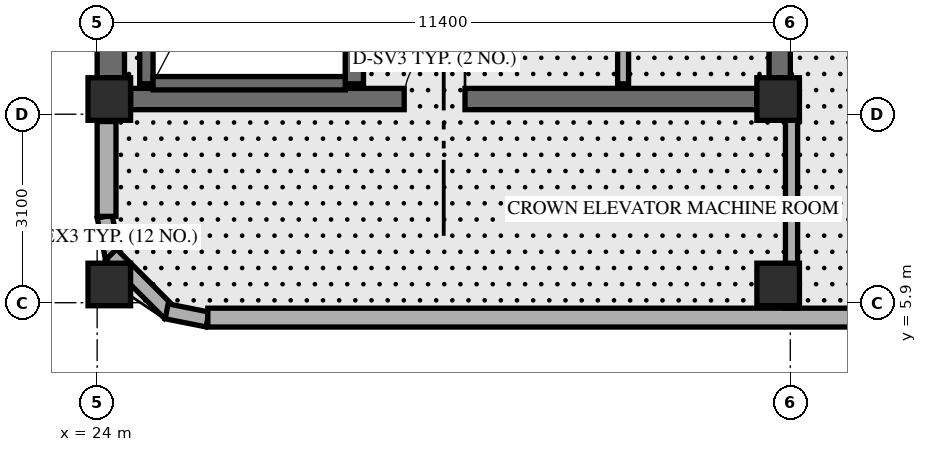
"""IFC4 building model, lengths in metres.
Left out: names, types, materials, properties, quantities, classifications, styles, units other than length and angle.
Written with IfcOpenShell. Run it as: python <this file> out.ifc"""

import sys

from ifc_helpers import new_model, si_unit, direction, frame, frame_2d, origin, origin_2d, place, context, subcontext, project, spatial, rectangle, extrude, element, fill, save


model = new_model("IFC4")
c1 = context("Model", 3, precision=1e-05, world=origin(), true_north=direction((0.0, 1.0)))
c2 = subcontext(c1, "Body", "Model", "MODEL_VIEW")
j1 = project(units=[si_unit("LENGTHUNIT", "METRE"), si_unit("PLANEANGLEUNIT", "RADIAN")], contexts=[c1])
p1 = place(None, origin())
s1 = spatial("IfcSite", under=j1, at=p1, CompositionType="ELEMENT")
p2 = place(p1, origin())
s2 = spatial("IfcBuilding", under=s1, at=p2, CompositionType="ELEMENT")
p3 = place(p2, frame((0.0, 0.0, 287.0)))
s3 = spatial("IfcBuildingStorey", under=s2, at=p3, CompositionType="ELEMENT", Elevation=287.0)
p4 = place(p3, frame((24.225, 9.6, 0.0), z_axis=(0.0, 0.0, 1.0), x_axis=(0.0, 1.0, 0.0)))
e1 = element("IfcWall", 1, at=p4, inside=s3, PredefinedType="SHEAR", context=c2, shape_type="SweptSolid", body=[
    extrude(rectangle(XDim=7.6, YDim=0.45, at=frame_2d((3.8, 0.0))), origin(), (0.0, 0.0, 1.0), 5.161),
])
p5 = place(p3, frame((35.225, 9.6, 0.0), z_axis=(0.0, 0.0, 1.0), x_axis=(0.0, 1.0, 0.0)))
e2 = element("IfcWall", 2, at=p5, inside=s3, PredefinedType="SHEAR", context=c2, shape_type="SweptSolid", body=[
    extrude(rectangle(XDim=5.95, YDim=0.35, at=frame_2d((2.975, 0.0))), origin(), (0.0, 0.0, 1.0), 5.161),
])
p6 = place(p3, frame((24.55, 9.25, 0.0), z_axis=(0.0, 0.0, 1.0), x_axis=(1.0, 0.0, 0.0)))
e3 = element("IfcWall", 3, at=p6, inside=s3, PredefinedType="SHEAR", context=c2, shape_type="SweptSolid", body=[
    extrude(rectangle(XDim=10.3, YDim=0.35, at=frame_2d((5.15, 0.0))), origin(), (0.0, 0.0, 1.0), 5.7),
])
p7 = place(p6, frame((4.5, 0.0, 0.0)))
e4 = element("IfcOpeningElement", 4, at=p7, cuts=e3, PredefinedType="OPENING", context=c2, shape_type="SweptSolid", body=[
    extrude(rectangle(XDim=1.0, YDim=2.15, at=frame_2d((0.5, 1.075))), frame((0.0, 0.185, 0.0), z_axis=(0.0, -1.0, 0.0), x_axis=(1.0, 0.0, 0.0)), (0.0, 0.0, 1.0), 0.37),
])
p8 = place(p3, frame((24.81, 9.5, 0.0), z_axis=(0.0, 0.0, 1.0), x_axis=(0.0, 1.0, 0.0)))
e5 = element("IfcWall", 5, at=p8, inside=s3, PredefinedType="SHEAR", context=c2, shape_type="SweptSolid", body=[
    extrude(rectangle(XDim=7.76, YDim=0.22, at=frame_2d((3.88, 0.0))), origin(), (0.0, 0.0, 1.0), 5.7),
])
p9 = place(p3, frame((28.23, 9.5, 0.0), z_axis=(0.0, 0.0, 1.0), x_axis=(0.0, 1.0, 0.0)))
e6 = element("IfcWall", 6, at=p9, inside=s3, PredefinedType="SHEAR", context=c2, shape_type="SweptSolid", body=[
    extrude(rectangle(XDim=7.76, YDim=0.3, at=frame_2d((3.88, 0.0))), origin(), (0.0, 0.0, 1.0), 5.7),
])
p10 = place(p3, frame((24.92, 9.51, 0.0), z_axis=(0.0, 0.0, 1.0), x_axis=(1.0, 0.0, 0.0)))
e7 = element("IfcWall", 7, at=p10, inside=s3, PredefinedType="SHEAR", context=c2, shape_type="SweptSolid", body=[
    extrude(rectangle(XDim=3.16, YDim=0.22, at=frame_2d((1.58, 0.0))), origin(), (0.0, 0.0, 1.0), 5.7),
])
for number, where, z_axis, x_axis in (
    (8, (24.2, 6.2, 0.0), (0.0, 0.0, 1.0), (1.0, 0.0, 0.0)),
    (9, (24.2, 9.25, 0.0), (0.0, 0.0, 1.0), (1.0, 0.0, 0.0)),
    (10, (35.2, 6.2, 0.0), (0.0, 0.0, 1.0), (1.0, 0.0, 0.0)),
    (11, (35.2, 9.25, 0.0), (0.0, 0.0, 1.0), (1.0, 0.0, 0.0)),
):
    element("IfcColumn", number, at=place(p3, frame(where, z_axis=z_axis, x_axis=x_axis)), inside=s3, PredefinedType="COLUMN", context=c2, shape_type="SweptSolid", body=[
        extrude(rectangle(XDim=0.7, YDim=0.7, at=origin_2d()), origin(), (0.0, 0.0, 1.0), 5.996),
    ])
p11 = place(p3, frame((24.124, 7.316, 0.0), z_axis=(0.0, 0.0, 1.0), x_axis=(0.194952956674, -0.980812594069, 0.0)))
e12 = element("IfcWall", 12, at=p11, inside=s3, PredefinedType="SOLIDWALL", context=c2, shape_type="SweptSolid", body=[
    extrude(rectangle(XDim=0.686, YDim=0.25, at=frame_2d((0.343, 0.0))), origin(), (0.0, 0.0, 1.0), 5.143),
])
p12 = place(p3, frame((24.231, 6.694, 0.0), z_axis=(0.0, 0.0, 1.0), x_axis=(0.707106781187, -0.707106781187, 0.0)))
e13 = element("IfcWall", 13, at=p12, inside=s3, PredefinedType="SOLIDWALL", context=c2, shape_type="SweptSolid", body=[
    extrude(rectangle(XDim=1.362, YDim=0.25, at=frame_2d((0.681, 0.0))), origin(), (0.0, 0.0, 1.0), 5.143),
])
p13 = place(p3, frame((25.143, 5.758, 0.0), z_axis=(0.0, 0.0, 1.0), x_axis=(0.980812594069, -0.194952956674, 0.0)))
e14 = element("IfcWall", 14, at=p13, inside=s3, PredefinedType="SOLIDWALL", context=c2, shape_type="SweptSolid", body=[
    extrude(rectangle(XDim=0.686, YDim=0.25, at=frame_2d((0.343, 0.0))), origin(), (0.0, 0.0, 1.0), 5.7),
])
p14 = place(p3, frame((25.82, 5.655, 0.0), z_axis=(0.0, 0.0, 1.0), x_axis=(1.0, 0.0, 0.0)))
e15 = element("IfcWall", 15, at=p14, inside=s3, PredefinedType="SOLIDWALL", context=c2, shape_type="SweptSolid", body=[
    extrude(rectangle(XDim=32.96, YDim=0.31, at=frame_2d((16.48, 0.0))), origin(), (0.0, 0.0, 1.0), 5.7),
])
p15 = place(p3, frame((24.155, 7.32, 0.0), z_axis=(0.0, 0.0, 1.0), x_axis=(0.0, 1.0, 0.0)))
e16 = element("IfcWall", 16, at=p15, inside=s3, PredefinedType="SOLIDWALL", context=c2, shape_type="SweptSolid", body=[
    extrude(rectangle(XDim=1.56, YDim=0.31, at=frame_2d((0.78, 0.0))), origin(), (0.0, 0.0, 1.0), 5.143),
])
p16 = place(p3, frame((32.65, 9.5, 0.0), z_axis=(0.0, 0.0, 1.0), x_axis=(0.0, 1.0, 0.0)))
e17 = element("IfcWall", 17, at=p16, inside=s3, PredefinedType="STANDARD", context=c2, shape_type="SweptSolid", body=[
    extrude(rectangle(XDim=6.08, YDim=0.18, at=frame_2d((3.04, 0.0))), origin(), (0.0, 0.0, 1.0), 5.7),
])
p17 = place(p16, frame((0.63, 0.0, 0.0)))
e18 = element("IfcOpeningElement", 18, at=p17, cuts=e17, PredefinedType="OPENING", context=c2, shape_type="SweptSolid", body=[
    extrude(rectangle(XDim=0.9, YDim=2.1, at=frame_2d((0.45, 1.05))), frame((0.0, 0.1, 0.0), z_axis=(0.0, -1.0, 0.0), x_axis=(1.0, 0.0, 0.0)), (0.0, 0.0, 1.0), 0.2),
])
p18 = place(p16, frame((2.63, 0.0, 0.0)))
e19 = element("IfcOpeningElement", 19, at=p18, cuts=e17, PredefinedType="OPENING", context=c2, shape_type="SweptSolid", body=[
    extrude(rectangle(XDim=0.9, YDim=2.1, at=frame_2d((0.45, 1.05))), frame((0.0, 0.1, 0.0), z_axis=(0.0, -1.0, 0.0), x_axis=(1.0, 0.0, 0.0)), (0.0, 0.0, 1.0), 0.2),
])
p19 = place(p16, frame((4.63, 0.0, 0.0)))
e20 = element("IfcOpeningElement", 20, at=p19, cuts=e17, PredefinedType="OPENING", context=c2, shape_type="SweptSolid", body=[
    extrude(rectangle(XDim=0.9, YDim=2.1, at=frame_2d((0.45, 1.05))), frame((0.0, 0.1, 0.0), z_axis=(0.0, -1.0, 0.0), x_axis=(1.0, 0.0, 0.0)), (0.0, 0.0, 1.0), 0.2),
])
p20 = place(p3, frame((35.42, 5.81, 0.0), z_axis=(0.0, 0.0, 1.0), x_axis=(0.0, 1.0, 0.0)))
e21 = element("IfcWall", 21, at=p20, inside=s3, PredefinedType="STANDARD", context=c2, shape_type="SweptSolid", body=[
    extrude(rectangle(XDim=3.44, YDim=0.2, at=frame_2d((1.72, 0.0))), origin(), (0.0, 0.0, 1.0), 5.143),
])
p21 = place(p7, frame((1.0, 0.0, 0.0), z_axis=(0.0, 0.0, 1.0), x_axis=(-1.0, 0.0, 0.0)))
e22 = element("IfcDoor", 22, at=p21, inside=s3, OperationType="SINGLE_SWING_LEFT", PredefinedType="DOOR", context=c2, shape_type="SweptSolid", body=[
    extrude(rectangle(XDim=1.0, YDim=2.15, at=frame_2d((0.5, 1.075))), frame((0.0, 0.025, 0.0), z_axis=(0.0, -1.0, 0.0), x_axis=(1.0, 0.0, 0.0)), (0.0, 0.0, 1.0), 0.05),
])
fill(e4, e22)
save(model, sys.argv[1])
